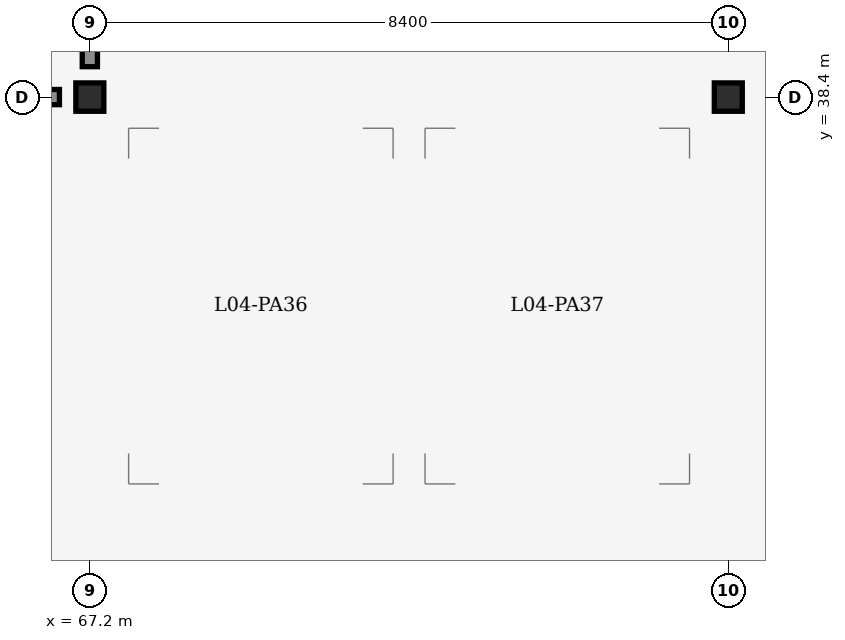
"""IFC4 building model, lengths in metres.
Left out: names, types, materials, properties, quantities, classifications, styles, units other than length and angle.
Written with IfcOpenShell. Run it as: python <this file> out.ifc"""

import sys

from ifc_helpers import new_model, si_unit, direction, frame, frame_2d, origin, origin_2d, place, context, subcontext, project, spatial, rectangle, i_section, extrude, element, save


model = new_model("IFC4")
c1 = context("Model", 3, precision=1e-05, world=origin(), true_north=direction((0.0, 1.0)))
c2 = subcontext(c1, "Body", "Model", "MODEL_VIEW")
j1 = project(units=[si_unit("LENGTHUNIT", "METRE"), si_unit("PLANEANGLEUNIT", "RADIAN")], contexts=[c1])
p1 = place(None, origin())
s1 = spatial("IfcSite", under=j1, at=p1, CompositionType="ELEMENT")
p2 = place(p1, origin())
s2 = spatial("IfcBuilding", under=s1, at=p2, CompositionType="ELEMENT")
p3 = place(p2, frame((0.0, 0.0, 16.2)))
s3 = spatial("IfcBuildingStorey", under=s2, at=p3, CompositionType="ELEMENT", Elevation=16.2)
for number, where, z_axis, x_axis in (
    (1, (67.2, 38.4, 0.0), (0.0, 0.0, 1.0), (1.0, 0.0, 0.0)),
    (2, (75.6, 38.4, 0.0), (0.0, 0.0, 1.0), (1.0, 0.0, 0.0)),
):
    element("IfcColumn", number, at=place(p3, frame(where, z_axis=z_axis, x_axis=x_axis)), inside=s3, PredefinedType="COLUMN", context=c2, shape_type="SweptSolid", body=[
        extrude(i_section(OverallWidth=0.373, OverallDepth=0.368, WebThickness=0.014, FlangeThickness=0.024, FilletRadius=0.015, at=origin_2d()), origin(), (0.0, 0.0, 1.0), 3.6),
    ])
p4 = place(p3, frame((59.2, 38.4, 0.0), z_axis=(0.0, 0.0, 1.0), x_axis=(1.0, 0.0, 0.0)))
e3 = element("IfcWall", 3, at=p4, inside=s3, PredefinedType="PARTITIONING", context=c2, shape_type="SweptSolid", body=[
    extrude(rectangle(XDim=7.6, YDim=0.2, at=frame_2d((3.8, 0.0))), origin(), (0.0, 0.0, 1.0), 2.525),
])
p5 = place(p4, frame((3.2, 0.0, 0.0)))
e4 = element("IfcOpeningElement", 4, at=p5, cuts=e3, PredefinedType="OPENING", context=c2, shape_type="SweptSolid", body=[
    extrude(rectangle(XDim=0.92, YDim=2.1, at=frame_2d((0.46, 1.05))), frame((0.0, 0.11, 0.0), z_axis=(0.0, -1.0, 0.0), x_axis=(1.0, 0.0, 0.0)), (0.0, 0.0, 1.0), 0.22),
])
p6 = place(p3, frame((67.2, 38.8, 0.0), z_axis=(0.0, 0.0, 1.0), x_axis=(0.0, 1.0, 0.0)))
e5 = element("IfcWall", 5, at=p6, inside=s3, PredefinedType="PARTITIONING", context=c2, shape_type="SweptSolid", body=[
    extrude(rectangle(XDim=7.6, YDim=0.2, at=frame_2d((3.8, 0.0))), origin(), (0.0, 0.0, 1.0), 2.525),
])
save(model, sys.argv[1])
